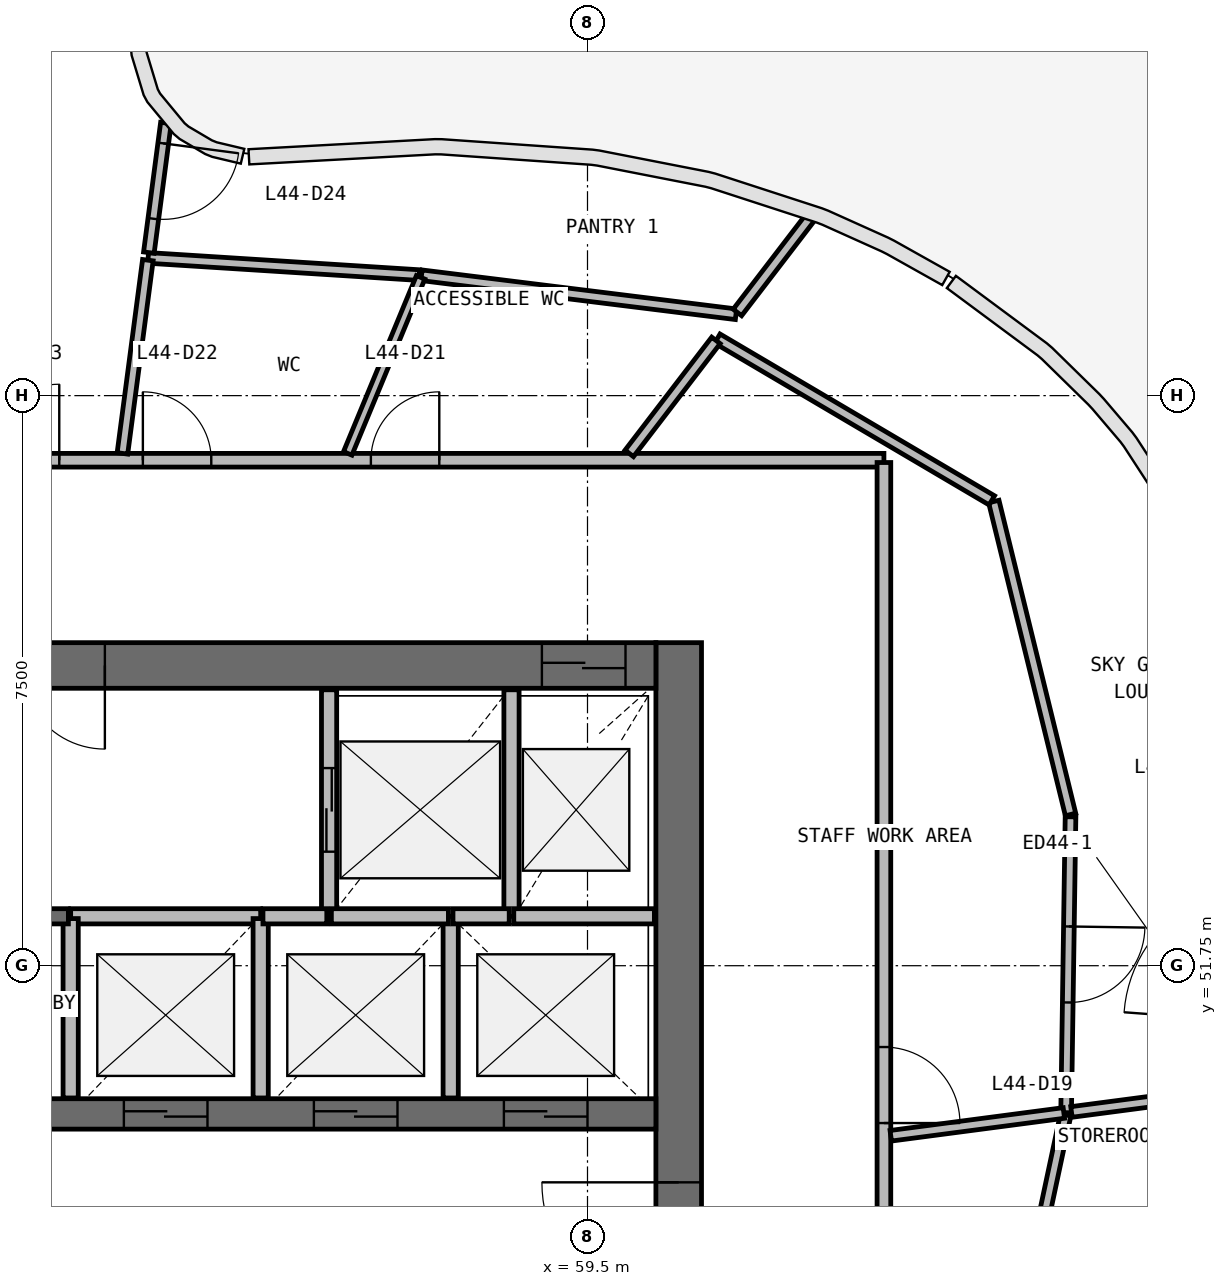
"""IFC4 building model, lengths in metres.
Left out: names, types, materials, properties, quantities, classifications, styles, units other than length and angle.
Written with IfcOpenShell. Run it as: python <this file> out.ifc"""

import sys

from ifc_helpers import new_model, si_unit, direction, frame, frame_2d, origin, place, context, subcontext, project, spatial, rectangle, extrude, source, transform, mapped, element, fill, save


model = new_model("IFC4")
c1 = context("Model", 3, precision=1e-05, world=origin(), true_north=direction((0.0, 1.0)))
c2 = subcontext(c1, "Body", "Model", "MODEL_VIEW")
j1 = project(units=[si_unit("LENGTHUNIT", "METRE"), si_unit("PLANEANGLEUNIT", "RADIAN")], contexts=[c1])
p1 = place(None, origin())
s1 = spatial("IfcSite", under=j1, at=p1, CompositionType="ELEMENT")
p2 = place(p1, origin())
s2 = spatial("IfcBuilding", under=s1, at=p2, CompositionType="ELEMENT")
p3 = place(p2, frame((0.0, 0.0, 183.8)))
s3 = spatial("IfcBuildingStorey", under=s2, at=p3, CompositionType="ELEMENT", Elevation=183.8)
p4 = place(p3, frame((60.7, 40.0, 0.0), z_axis=(0.0, 0.0, 1.0), x_axis=(0.0, 1.0, 0.0)))
e1 = element("IfcWall", 1, at=p4, inside=s3, PredefinedType="SHEAR", context=c2, shape_type="SweptSolid", body=[
    extrude(rectangle(XDim=16.0, YDim=0.6, at=frame_2d((8.0, 0.0))), origin(), (0.0, 0.0, 1.0), 3.9),
])
p5 = place(p4, frame((7.1, 0.0, 0.0)))
e2 = element("IfcOpeningElement", 2, at=p5, cuts=e1, PredefinedType="OPENING", context=c2, shape_type="SweptSolid", body=[
    extrude(rectangle(XDim=1.8, YDim=2.1, at=frame_2d((0.9, 1.05))), frame((0.0, 0.31, 0.0), z_axis=(0.0, -1.0, 0.0), x_axis=(1.0, 0.0, 0.0)), (0.0, 0.0, 1.0), 0.62),
])
p6 = place(p3, frame((60.4, 55.7, 0.0), z_axis=(0.0, 0.0, 1.0), x_axis=(-1.0, 0.0, 0.0)))
e3 = element("IfcWall", 3, at=p6, inside=s3, PredefinedType="SHEAR", context=c2, shape_type="SweptSolid", body=[
    extrude(rectangle(XDim=16.8, YDim=0.6, at=frame_2d((8.4, 0.0))), origin(), (0.0, 0.0, 1.0), 3.9),
])
p7 = place(p6, frame((0.4, 0.0, 0.0)))
e4 = element("IfcOpeningElement", 4, at=p7, cuts=e3, PredefinedType="OPENING", context=c2, shape_type="SweptSolid", body=[
    extrude(rectangle(XDim=1.1, YDim=2.1, at=frame_2d((0.55, 1.05))), frame((0.0, 0.31, 0.0), z_axis=(0.0, -1.0, 0.0), x_axis=(1.0, 0.0, 0.0)), (0.0, 0.0, 1.0), 0.62),
])
p8 = place(p6, frame((10.3, 0.0, 0.0)))
e5 = element("IfcOpeningElement", 5, at=p8, cuts=e3, PredefinedType="OPENING", context=c2, shape_type="SweptSolid", body=[
    extrude(rectangle(XDim=1.2, YDim=2.1, at=frame_2d((0.6, 1.05))), frame((0.0, 0.31, 0.0), z_axis=(0.0, -1.0, 0.0), x_axis=(1.0, 0.0, 0.0)), (0.0, 0.0, 1.0), 0.62),
])
p9 = place(p6, frame((7.25, 0.0, 0.0)))
e6 = element("IfcOpeningElement", 6, at=p9, cuts=e3, PredefinedType="OPENING", context=c2, shape_type="SweptSolid", body=[
    extrude(rectangle(XDim=1.1, YDim=2.1, at=frame_2d((0.55, 1.05))), frame((0.0, 0.31, 0.0), z_axis=(0.0, -1.0, 0.0), x_axis=(1.0, 0.0, 0.0)), (0.0, 0.0, 1.0), 0.62),
])
p10 = place(p3, frame((43.6, 49.8, 0.0), z_axis=(0.0, 0.0, 1.0), x_axis=(1.0, 0.0, 0.0)))
e7 = element("IfcWall", 7, at=p10, inside=s3, PredefinedType="SHEAR", context=c2, shape_type="SweptSolid", body=[
    extrude(rectangle(XDim=16.8, YDim=0.4, at=frame_2d((8.4, 0.0))), origin(), (0.0, 0.0, 1.0), 3.9),
])
p11 = place(p10, frame((9.8, 0.0, 0.0)))
e8 = element("IfcOpeningElement", 8, at=p11, cuts=e7, PredefinedType="OPENING", context=c2, shape_type="SweptSolid", body=[
    extrude(rectangle(XDim=1.1, YDim=2.1, at=frame_2d((0.55, 1.05))), frame((0.0, 0.21, 0.0), z_axis=(0.0, -1.0, 0.0), x_axis=(1.0, 0.0, 0.0)), (0.0, 0.0, 1.0), 0.42),
])
p12 = place(p10, frame((12.3, 0.0, 0.0)))
e9 = element("IfcOpeningElement", 9, at=p12, cuts=e7, PredefinedType="OPENING", context=c2, shape_type="SweptSolid", body=[
    extrude(rectangle(XDim=1.1, YDim=2.1, at=frame_2d((0.55, 1.05))), frame((0.0, 0.21, 0.0), z_axis=(0.0, -1.0, 0.0), x_axis=(1.0, 0.0, 0.0)), (0.0, 0.0, 1.0), 0.42),
])
p13 = place(p10, frame((14.8, 0.0, 0.0)))
e10 = element("IfcOpeningElement", 10, at=p13, cuts=e7, PredefinedType="OPENING", context=c2, shape_type="SweptSolid", body=[
    extrude(rectangle(XDim=1.1, YDim=2.1, at=frame_2d((0.55, 1.05))), frame((0.0, 0.21, 0.0), z_axis=(0.0, -1.0, 0.0), x_axis=(1.0, 0.0, 0.0)), (0.0, 0.0, 1.0), 0.42),
])
p14 = place(p10, frame((4.45, 0.0, 0.0)))
e11 = element("IfcOpeningElement", 11, at=p14, cuts=e7, PredefinedType="OPENING", context=c2, shape_type="SweptSolid", body=[
    extrude(rectangle(XDim=0.9, YDim=2.1, at=frame_2d((0.45, 1.05))), frame((0.0, 0.21, 0.0), z_axis=(0.0, -1.0, 0.0), x_axis=(1.0, 0.0, 0.0)), (0.0, 0.0, 1.0), 0.42),
])
p15 = place(p10, frame((7.85, 0.0, 0.0)))
e12 = element("IfcOpeningElement", 12, at=p15, cuts=e7, PredefinedType="OPENING", context=c2, shape_type="SweptSolid", body=[
    extrude(rectangle(XDim=0.9, YDim=2.1, at=frame_2d((0.45, 1.05))), frame((0.0, 0.21, 0.0), z_axis=(0.0, -1.0, 0.0), x_axis=(1.0, 0.0, 0.0)), (0.0, 0.0, 1.0), 0.42),
])
p16 = place(p3, frame((56.1, 55.38, 0.0), z_axis=(0.0, 0.0, 1.0), x_axis=(0.0, -1.0, 0.0)))
e13 = element("IfcWall", 13, at=p16, inside=s3, PredefinedType="SOLIDWALL", context=c2, shape_type="SweptSolid", body=[
    extrude(rectangle(XDim=2.98, YDim=0.2, at=frame_2d((1.49, 0.0))), origin(), (0.0, 0.0, 1.0), 3.58),
])
p17 = place(p16, frame((1.03, 0.0, 0.0)))
e14 = element("IfcOpeningElement", 14, at=p17, cuts=e13, PredefinedType="OPENING", context=c2, shape_type="SweptSolid", body=[
    extrude(rectangle(XDim=1.1, YDim=2.1, at=frame_2d((0.55, 1.05))), frame((0.0, 0.11, 0.0), z_axis=(0.0, -1.0, 0.0), x_axis=(1.0, 0.0, 0.0)), (0.0, 0.0, 1.0), 0.22),
])
p18 = place(p3, frame((58.5, 52.4, 0.0), z_axis=(0.0, 0.0, 1.0), x_axis=(0.0, 1.0, 0.0)))
e15 = element("IfcWall", 15, at=p18, inside=s3, PredefinedType="SOLIDWALL", context=c2, shape_type="SweptSolid", body=[
    extrude(rectangle(XDim=2.98, YDim=0.2, at=frame_2d((1.49, 0.0))), origin(), (0.0, 0.0, 1.0), 3.58),
])
p19 = place(p3, frame((55.2, 52.4, 0.0), z_axis=(0.0, 0.0, 1.0), x_axis=(-1.0, 0.0, 0.0)))
e16 = element("IfcWall", 16, at=p19, inside=s3, PredefinedType="SOLIDWALL", context=c2, shape_type="SweptSolid", body=[
    extrude(rectangle(XDim=2.5, YDim=0.2, at=frame_2d((1.25, 0.0))), origin(), (0.0, 0.0, 1.0), 3.58),
])
for number, where, z_axis, x_axis in (
    (17, (52.7, 52.37, 0.0), (0.0, 0.0, 1.0), (0.0, -1.0, 0.0)),
    (18, (55.2, 50.01, 0.0), (0.0, 0.0, 1.0), (0.0, 1.0, 0.0)),
):
    element("IfcWall", number, at=place(p3, frame(where, z_axis=z_axis, x_axis=x_axis)), inside=s3, PredefinedType="SOLIDWALL", context=c2, shape_type="SweptSolid", body=[
        extrude(rectangle(XDim=2.36, YDim=0.2, at=frame_2d((1.18, 0.0))), origin(), (0.0, 0.0, 1.0), 3.58),
    ])
p20 = place(p3, frame((57.7, 50.01, 0.0), z_axis=(0.0, 0.0, 1.0), x_axis=(0.0, 1.0, 0.0)))
e19 = element("IfcWall", 19, at=p20, inside=s3, PredefinedType="SOLIDWALL", context=c2, shape_type="SweptSolid", body=[
    extrude(rectangle(XDim=2.39, YDim=0.2, at=frame_2d((1.195, 0.0))), origin(), (0.0, 0.0, 1.0), 3.58),
])
p21 = place(p3, frame((50.43, 52.4, 0.0), z_axis=(0.0, 0.0, 1.0), x_axis=(1.0, 0.0, 0.0)))
e20 = element("IfcWall", 20, at=p21, inside=s3, PredefinedType="SOLIDWALL", context=c2, shape_type="SweptSolid", body=[
    extrude(rectangle(XDim=2.24, YDim=0.2, at=frame_2d((1.12, 0.0))), origin(), (0.0, 0.0, 1.0), 3.58),
])
p22 = place(p3, frame((60.38, 52.4, 0.0), z_axis=(0.0, 0.0, 1.0), x_axis=(-1.0, 0.0, 0.0)))
e21 = element("IfcWall", 21, at=p22, inside=s3, PredefinedType="SOLIDWALL", context=c2, shape_type="SweptSolid", body=[
    extrude(rectangle(XDim=1.85, YDim=0.2, at=frame_2d((0.925, 0.0))), origin(), (0.0, 0.0, 1.0), 3.58),
])
p23 = place(p3, frame((57.67, 52.4, 0.0), z_axis=(0.0, 0.0, 1.0), x_axis=(-1.0, 0.0, 0.0)))
e22 = element("IfcWall", 22, at=p23, inside=s3, PredefinedType="SOLIDWALL", context=c2, shape_type="SweptSolid", body=[
    extrude(rectangle(XDim=1.54, YDim=0.2, at=frame_2d((0.77, 0.0))), origin(), (0.0, 0.0, 1.0), 3.58),
])
p24 = place(p3, frame((56.07, 52.4, 0.0), z_axis=(0.0, 0.0, 1.0), x_axis=(-1.0, 0.0, 0.0)))
e23 = element("IfcWall", 23, at=p24, inside=s3, PredefinedType="SOLIDWALL", context=c2, shape_type="SweptSolid", body=[
    extrude(rectangle(XDim=0.84, YDim=0.2, at=frame_2d((0.42, 0.0))), origin(), (0.0, 0.0, 1.0), 3.58),
])
p25 = place(p3, frame((58.47, 52.4, 0.0), z_axis=(0.0, 0.0, 1.0), x_axis=(-1.0, 0.0, 0.0)))
e24 = element("IfcWall", 24, at=p25, inside=s3, PredefinedType="SOLIDWALL", context=c2, shape_type="SweptSolid", body=[
    extrude(rectangle(XDim=0.74, YDim=0.2, at=frame_2d((0.37, 0.0))), origin(), (0.0, 0.0, 1.0), 3.58),
])
p26 = place(p3, frame((40.6, 58.4, 0.0), z_axis=(0.0, 0.0, 1.0), x_axis=(1.0, 0.0, 0.0)))
e25 = element("IfcWall", 25, at=p26, inside=s3, PredefinedType="PARTITIONING", context=c2, shape_type="SweptSolid", body=[
    extrude(rectangle(XDim=22.8, YDim=0.18, at=frame_2d((11.4, 0.0))), origin(), (0.0, 0.0, 1.0), 2.88),
])
p27 = place(p26, frame((16.05, 0.0, 0.0)))
e26 = element("IfcOpeningElement", 26, at=p27, cuts=e25, PredefinedType="OPENING", context=c2, shape_type="SweptSolid", body=[
    extrude(rectangle(XDim=0.9, YDim=2.1, at=frame_2d((0.45, 1.05))), frame((0.0, 0.1, 0.0), z_axis=(0.0, -1.0, 0.0), x_axis=(1.0, 0.0, 0.0)), (0.0, 0.0, 1.0), 0.2),
])
p28 = place(p26, frame((13.05, 0.0, 0.0)))
e27 = element("IfcOpeningElement", 27, at=p28, cuts=e25, PredefinedType="OPENING", context=c2, shape_type="SweptSolid", body=[
    extrude(rectangle(XDim=0.9, YDim=2.1, at=frame_2d((0.45, 1.05))), frame((0.0, 0.1, 0.0), z_axis=(0.0, -1.0, 0.0), x_axis=(1.0, 0.0, 0.0)), (0.0, 0.0, 1.0), 0.2),
])
p29 = place(p26, frame((10.95, 0.0, 0.0)))
e28 = element("IfcOpeningElement", 28, at=p29, cuts=e25, PredefinedType="OPENING", context=c2, shape_type="SweptSolid", body=[
    extrude(rectangle(XDim=1.0, YDim=2.1, at=frame_2d((0.5, 1.05))), frame((0.0, 0.1, 0.0), z_axis=(0.0, -1.0, 0.0), x_axis=(1.0, 0.0, 0.0)), (0.0, 0.0, 1.0), 0.2),
])
p30 = place(p3, frame((63.4, 58.37, 0.0), z_axis=(0.0, 0.0, 1.0), x_axis=(0.0, -1.0, 0.0)))
e29 = element("IfcWall", 29, at=p30, inside=s3, PredefinedType="PARTITIONING", context=c2, shape_type="SweptSolid", body=[
    extrude(rectangle(XDim=20.74, YDim=0.18, at=frame_2d((10.37, 0.0))), origin(), (0.0, 0.0, 1.0), 2.88),
])
p31 = place(p30, frame((7.69, 0.0, 0.0)))
e30 = element("IfcOpeningElement", 30, at=p31, cuts=e29, PredefinedType="OPENING", context=c2, shape_type="SweptSolid", body=[
    extrude(rectangle(XDim=1.0, YDim=2.1, at=frame_2d((0.5, 1.05))), frame((0.0, 0.1, 0.0), z_axis=(0.0, -1.0, 0.0), x_axis=(1.0, 0.0, 0.0)), (0.0, 0.0, 1.0), 0.2),
])
p32 = place(p30, frame((9.89, 0.0, 0.0)))
e31 = element("IfcOpeningElement", 31, at=p32, cuts=e29, PredefinedType="OPENING", context=c2, shape_type="SweptSolid", body=[
    extrude(rectangle(XDim=1.0, YDim=2.1, at=frame_2d((0.5, 1.05))), frame((0.0, 0.1, 0.0), z_axis=(0.0, -1.0, 0.0), x_axis=(1.0, 0.0, 0.0)), (0.0, 0.0, 1.0), 0.2),
])
p33 = place(p3, frame((65.856, 53.739, 0.0), z_axis=(0.0, 0.0, 1.0), x_axis=(-0.23822460229, 0.971210089972, 0.0)))
e32 = element("IfcWall", 32, at=p33, inside=s3, PredefinedType="PARTITIONING", context=c2, shape_type="SweptSolid", body=[
    extrude(rectangle(XDim=4.24, YDim=0.14, at=frame_2d((2.12, 0.0))), origin(), (0.0, 0.0, 1.0), 2.88),
])
p34 = place(p3, frame((64.82, 57.872, 0.0), z_axis=(0.0, 0.0, 1.0), x_axis=(-0.861535732384, 0.507696938957, 0.0)))
e33 = element("IfcWall", 33, at=p34, inside=s3, PredefinedType="PARTITIONING", context=c2, shape_type="SweptSolid", body=[
    extrude(rectangle(XDim=4.192, YDim=0.14, at=frame_2d((2.096, 0.0))), origin(), (0.0, 0.0, 1.0), 2.88),
])
p35 = place(p3, frame((61.454, 60.321, 0.0), z_axis=(0.0, 0.0, 1.0), x_axis=(-0.99239722015, 0.123076226135, 0.0)))
e34 = element("IfcWall", 34, at=p35, inside=s3, PredefinedType="PARTITIONING", context=c2, shape_type="SweptSolid", body=[
    extrude(rectangle(XDim=4.17, YDim=0.14, at=frame_2d((2.085, 0.0))), origin(), (0.0, 0.0, 1.0), 2.88),
])
p36 = place(p3, frame((65.855, 53.709, 0.0), z_axis=(0.0, 0.0, 1.0), x_axis=(-0.014924646714, -0.999888621258, 0.0)))
e35 = element("IfcWall", 35, at=p36, inside=s3, PredefinedType="PARTITIONING", context=c2, shape_type="SweptSolid", body=[
    extrude(rectangle(XDim=3.893, YDim=0.14, at=frame_2d((1.947, 0.0))), origin(), (0.0, 0.0, 1.0), 2.88),
])
p37 = place(p36, frame((1.443, 0.0, 0.0)))
e36 = element("IfcOpeningElement", 36, at=p37, cuts=e35, PredefinedType="OPENING", context=c2, shape_type="SweptSolid", body=[
    extrude(rectangle(XDim=1.0, YDim=2.1, at=frame_2d((0.5, 1.05))), frame((0.0, 0.08, 0.0), z_axis=(0.0, -1.0, 0.0), x_axis=(1.0, 0.0, 0.0)), (0.0, 0.0, 1.0), 0.16),
])
p38 = place(p3, frame((65.791, 49.787, 0.0), z_axis=(0.0, 0.0, 1.0), x_axis=(-0.20840274736, -0.978043094599, 0.0)))
e37 = element("IfcWall", 37, at=p38, inside=s3, PredefinedType="PARTITIONING", context=c2, shape_type="SweptSolid", body=[
    extrude(rectangle(XDim=3.553, YDim=0.14, at=frame_2d((1.777, 0.0))), origin(), (0.0, 0.0, 1.0), 2.88),
])
p39 = place(p38, frame((1.303, 0.0, 0.0)))
e38 = element("IfcOpeningElement", 38, at=p39, cuts=e37, PredefinedType="OPENING", context=c2, shape_type="SweptSolid", body=[
    extrude(rectangle(XDim=1.0, YDim=2.1, at=frame_2d((0.5, 1.05))), frame((0.0, 0.08, 0.0), z_axis=(0.0, -1.0, 0.0), x_axis=(1.0, 0.0, 0.0)), (0.0, 0.0, 1.0), 0.16),
])
p40 = place(p3, frame((57.286, 60.836, 0.0), z_axis=(0.0, 0.0, 1.0), x_axis=(-0.997992577904, 0.063330991218, 0.0)))
e39 = element("IfcWall", 39, at=p40, inside=s3, PredefinedType="PARTITIONING", context=c2, shape_type="SweptSolid", body=[
    extrude(rectangle(XDim=3.573, YDim=0.14, at=frame_2d((1.787, 0.0))), origin(), (0.0, 0.0, 1.0), 2.88),
])
p41 = place(p3, frame((53.381, 58.49, 0.0), z_axis=(0.0, 0.0, 1.0), x_axis=(0.130535789174, 0.991443597864, 0.0)))
e40 = element("IfcWall", 40, at=p41, inside=s3, PredefinedType="PARTITIONING", context=c2, shape_type="SweptSolid", body=[
    extrude(rectangle(XDim=2.564, YDim=0.14, at=frame_2d((1.282, 0.0))), origin(), (0.0, 0.0, 1.0), 2.88),
])
p42 = place(p3, frame((65.867, 49.826, 0.0), z_axis=(0.0, 0.0, 1.0), x_axis=(0.991441898965, 0.130548691974, 0.0)))
e41 = element("IfcWall", 41, at=p42, inside=s3, PredefinedType="PARTITIONING", context=c2, shape_type="SweptSolid", body=[
    extrude(rectangle(XDim=2.347, YDim=0.14, at=frame_2d((1.173, 0.0))), origin(), (0.0, 0.0, 1.0), 2.88),
])
p43 = place(p3, frame((63.49, 49.513, 0.0), z_axis=(0.0, 0.0, 1.0), x_axis=(0.991447421324, 0.130506745995, 0.0)))
e42 = element("IfcWall", 42, at=p43, inside=s3, PredefinedType="PARTITIONING", context=c2, shape_type="SweptSolid", body=[
    extrude(rectangle(XDim=2.297, YDim=0.14, at=frame_2d((1.148, 0.0))), origin(), (0.0, 0.0, 1.0), 2.88),
])
p44 = place(p3, frame((60.049, 58.49, 0.0), z_axis=(0.0, 0.0, 1.0), x_axis=(0.60874059601, 0.793369325579, 0.0)))
e43 = element("IfcWall", 43, at=p44, inside=s3, PredefinedType="PARTITIONING", context=c2, shape_type="SweptSolid", body=[
    extrude(rectangle(XDim=1.874, YDim=0.14, at=frame_2d((0.937, 0.0))), origin(), (0.0, 0.0, 1.0), 2.88),
])
p45 = place(p3, frame((53.953, 62.836, 0.0), z_axis=(0.0, 0.0, 1.0), x_axis=(-0.130619781296, -0.991432535644, 0.0)))
e44 = element("IfcWall", 44, at=p45, inside=s3, PredefinedType="PARTITIONING", context=c2, shape_type="SweptSolid", body=[
    extrude(rectangle(XDim=1.719, YDim=0.14, at=frame_2d((0.86, 0.0))), origin(), (0.0, 0.0, 1.0), 2.88),
])
p46 = place(p45, frame((0.27, 0.0, 0.0)))
e45 = element("IfcOpeningElement", 45, at=p46, cuts=e44, PredefinedType="OPENING", context=c2, shape_type="SweptSolid", body=[
    extrude(rectangle(XDim=1.0, YDim=2.1, at=frame_2d((0.5, 1.05))), frame((0.0, 0.08, 0.0), z_axis=(0.0, -1.0, 0.0), x_axis=(1.0, 0.0, 0.0)), (0.0, 0.0, 1.0), 0.16),
])
p47 = place(p3, frame((61.472, 60.344, 0.0), z_axis=(0.0, 0.0, 1.0), x_axis=(0.608719514622, 0.793385500572, 0.0)))
e46 = element("IfcWall", 46, at=p47, inside=s3, PredefinedType="PARTITIONING", context=c2, shape_type="SweptSolid", body=[
    extrude(rectangle(XDim=1.584, YDim=0.14, at=frame_2d((0.792, 0.0))), origin(), (0.0, 0.0, 1.0), 2.88),
])
p48 = place(p3, frame((56.345, 58.49, 0.0), z_axis=(0.0, 0.0, 1.0), x_axis=(0.382664324241, 0.923887447124, 0.0)))
e47 = element("IfcWall", 47, at=p48, inside=s3, PredefinedType="PARTITIONING", context=c2, shape_type="SweptSolid", body=[
    extrude(rectangle(XDim=2.507, YDim=0.12, at=frame_2d((1.253, 0.0))), origin(), (0.0, 0.0, 1.0), 2.88),
])
m1 = source(origin(), c2, "Body", "SweptSolid", [
    extrude(rectangle(XDim=1.8, YDim=2.1, at=frame_2d((0.9, 1.05))), frame((0.0, 0.025, 0.0), z_axis=(0.0, -1.0, 0.0), x_axis=(1.0, 0.0, 0.0)), (0.0, 0.0, 1.0), 0.05),
])
p49 = place(p5, origin())
e48 = element("IfcDoor", 48, at=p49, inside=s3, OperationType="SINGLE_SWING_RIGHT", PredefinedType="DOOR", context=c2, shape_type="MappedRepresentation", body=[
    mapped(m1, transform((0.0, 0.0, 0.0), scale=1.0)),
])
fill(e2, e48)
m2 = source(origin(), c2, "Body", "SweptSolid", [
    extrude(rectangle(XDim=1.1, YDim=2.1, at=frame_2d((0.55, 1.05))), frame((0.0, 0.025, 0.0), z_axis=(0.0, -1.0, 0.0), x_axis=(1.0, 0.0, 0.0)), (0.0, 0.0, 1.0), 0.05),
])
p50 = place(p11, origin())
e49 = element("IfcDoor", 49, at=p50, inside=s3, OperationType="DOUBLE_DOOR_SLIDING", PredefinedType="USERDEFINED", context=c2, shape_type="MappedRepresentation", body=[
    mapped(m2, transform((0.0, 0.0, 0.0), scale=1.0)),
])
fill(e8, e49)
p51 = place(p12, origin())
e50 = element("IfcDoor", 50, at=p51, inside=s3, OperationType="DOUBLE_DOOR_SLIDING", PredefinedType="USERDEFINED", context=c2, shape_type="MappedRepresentation", body=[
    mapped(m2, transform((0.0, 0.0, 0.0), scale=1.0)),
])
fill(e9, e50)
p52 = place(p13, origin())
e51 = element("IfcDoor", 51, at=p52, inside=s3, OperationType="DOUBLE_DOOR_SLIDING", PredefinedType="USERDEFINED", context=c2, shape_type="MappedRepresentation", body=[
    mapped(m2, transform((0.0, 0.0, 0.0), scale=1.0)),
])
fill(e10, e51)
p53 = place(p17, origin())
e52 = element("IfcDoor", 52, at=p53, inside=s3, OperationType="DOUBLE_DOOR_SLIDING", PredefinedType="USERDEFINED", context=c2, shape_type="MappedRepresentation", body=[
    mapped(m2, transform((0.0, 0.0, 0.0), scale=1.0)),
])
fill(e14, e52)
p54 = place(p7, origin())
e53 = element("IfcDoor", 53, at=p54, inside=s3, OperationType="DOUBLE_DOOR_SLIDING", PredefinedType="USERDEFINED", context=c2, shape_type="MappedRepresentation", body=[
    mapped(m2, transform((0.0, 0.0, 0.0), scale=1.0)),
])
fill(e4, e53)
m3 = source(origin(), c2, "Body", "SweptSolid", [
    extrude(rectangle(XDim=1.1, YDim=2.1, at=frame_2d((0.55, 1.05))), frame((0.0, 0.025, 0.0), z_axis=(0.0, -1.0, 0.0), x_axis=(1.0, 0.0, 0.0)), (0.0, 0.0, 1.0), 0.05),
])
p55 = place(p9, origin())
e54 = element("IfcDoor", 54, at=p55, inside=s3, OperationType="SINGLE_SWING_LEFT", PredefinedType="DOOR", context=c2, shape_type="MappedRepresentation", body=[
    mapped(m3, transform((0.0, 0.0, 0.0), scale=1.0)),
])
fill(e6, e54)
m4 = source(origin(), c2, "Body", "SweptSolid", [
    extrude(rectangle(XDim=1.0, YDim=2.1, at=frame_2d((0.5, 1.05))), frame((0.0, 0.025, 0.0), z_axis=(0.0, -1.0, 0.0), x_axis=(1.0, 0.0, 0.0)), (0.0, 0.0, 1.0), 0.05),
])
p56 = place(p31, origin())
e55 = element("IfcDoor", 55, at=p56, inside=s3, OperationType="SINGLE_SWING_RIGHT", PredefinedType="DOOR", context=c2, shape_type="MappedRepresentation", body=[
    mapped(m4, transform((0.0, 0.0, 0.0), scale=1.0)),
])
fill(e30, e55)
p57 = place(p37, origin())
e56 = element("IfcDoor", 56, at=p57, inside=s3, OperationType="SINGLE_SWING_LEFT", PredefinedType="DOOR", context=c2, shape_type="MappedRepresentation", body=[
    mapped(m4, transform((0.0, 0.0, 0.0), scale=1.0)),
])
fill(e36, e56)
m5 = source(origin(), c2, "Body", "SweptSolid", [
    extrude(rectangle(XDim=0.9, YDim=2.1, at=frame_2d((0.45, 1.05))), frame((0.0, 0.025, 0.0), z_axis=(0.0, -1.0, 0.0), x_axis=(1.0, 0.0, 0.0)), (0.0, 0.0, 1.0), 0.05),
])
p58 = place(p27, origin())
e57 = element("IfcDoor", 57, at=p58, inside=s3, OperationType="SINGLE_SWING_RIGHT", PredefinedType="DOOR", context=c2, shape_type="MappedRepresentation", body=[
    mapped(m5, transform((0.0, 0.0, 0.0), scale=1.0)),
])
fill(e26, e57)
p59 = place(p28, origin())
e58 = element("IfcDoor", 58, at=p59, inside=s3, OperationType="SINGLE_SWING_LEFT", PredefinedType="DOOR", context=c2, shape_type="MappedRepresentation", body=[
    mapped(m5, transform((0.0, 0.0, 0.0), scale=1.0)),
])
fill(e27, e58)
p60 = place(p29, origin())
e59 = element("IfcDoor", 59, at=p60, inside=s3, OperationType="SINGLE_SWING_RIGHT", PredefinedType="DOOR", context=c2, shape_type="MappedRepresentation", body=[
    mapped(m4, transform((0.0, 0.0, 0.0), scale=1.0)),
])
fill(e28, e59)
p61 = place(p46, origin())
e60 = element("IfcDoor", 60, at=p61, inside=s3, OperationType="SINGLE_SWING_LEFT", PredefinedType="DOOR", context=c2, shape_type="MappedRepresentation", body=[
    mapped(m4, transform((0.0, 0.0, 0.0), scale=1.0)),
])
fill(e45, e60)
save(model, sys.argv[1])
